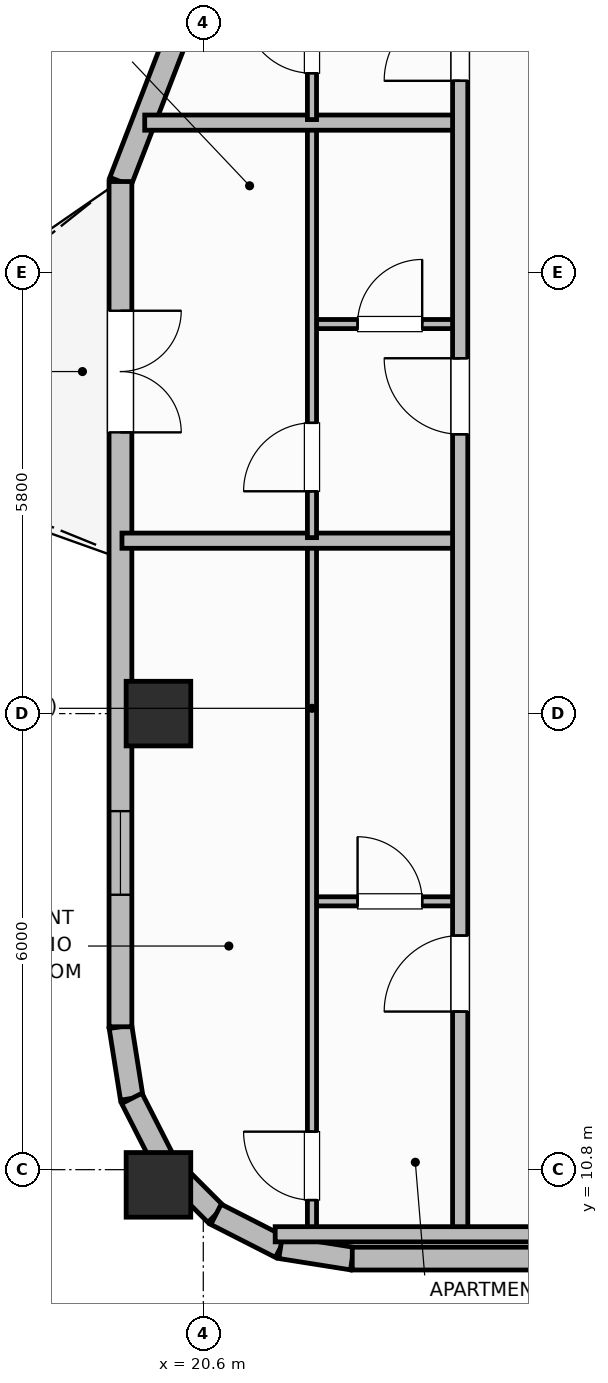
"""IFC4 building model, lengths in metres.
Left out: names, types, materials, properties, quantities, classifications, styles, units other than length and angle.
Written with IfcOpenShell. Run it as: python <this file> out.ifc"""

import sys

from ifc_helpers import new_model, si_unit, direction, frame, frame_2d, origin, origin_2d, place, context, subcontext, project, spatial, rectangle, extrude, element, fill, save


model = new_model("IFC4")
c1 = context("Model", 3, precision=1e-05, world=origin(), true_north=direction((0.0, 1.0)))
c2 = subcontext(c1, "Body", "Model", "MODEL_VIEW")
j1 = project(units=[si_unit("LENGTHUNIT", "METRE"), si_unit("PLANEANGLEUNIT", "RADIAN")], contexts=[c1])
p1 = place(None, origin())
s1 = spatial("IfcSite", under=j1, at=p1, CompositionType="ELEMENT")
p2 = place(p1, origin())
s2 = spatial("IfcBuilding", under=s1, at=p2, CompositionType="ELEMENT")
p3 = place(p2, frame((0.0, 0.0, 233.2)))
s3 = spatial("IfcBuildingStorey", under=s2, at=p3, CompositionType="ELEMENT", Elevation=233.2)
for number, where, z_axis, x_axis in (
    (1, (20.01, 10.6, 0.0), (0.0, 0.0, 1.0), (1.0, 0.0, 0.0)),
    (2, (20.01, 16.8, 0.0), (0.0, 0.0, 1.0), (1.0, 0.0, 0.0)),
):
    element("IfcColumn", number, at=place(p3, frame(where, z_axis=z_axis, x_axis=x_axis)), inside=s3, PredefinedType="COLUMN", context=c2, shape_type="SweptSolid", body=[
        extrude(rectangle(XDim=0.85, YDim=0.85, at=origin_2d()), origin(), (0.0, 0.0, 1.0), 3.7),
    ])
p4 = place(p3, frame((19.51, 12.68, 0.0), z_axis=(0.0, 0.0, 1.0), x_axis=(0.156343617883, -0.987702725088, 0.0)))
e3 = element("IfcWall", 3, at=p4, inside=s3, PredefinedType="SOLIDWALL", context=c2, shape_type="SweptSolid", body=[
    extrude(rectangle(XDim=0.954, YDim=0.3, at=frame_2d((0.477, 0.0))), origin(), (0.0, 0.0, 1.0), 2.73),
])
for number, where, z_axis, x_axis in (
    (4, (19.659, 11.738, 0.0), (0.0, 0.0, 1.0), (0.454, -0.891, 0.0)),
    (5, (20.093, 10.887, 0.0), (0.0, 0.0, 1.0), (0.707, -0.707, 0.0)),
):
    element("IfcWall", number, at=place(p3, frame(where, z_axis=z_axis, x_axis=x_axis)), inside=s3, PredefinedType="SOLIDWALL", context=c2, shape_type="SweptSolid", body=[
        extrude(rectangle(XDim=0.954, YDim=0.3, at=frame_2d((0.477, 0.0))), origin(), (0.0, 0.0, 1.0), 2.73),
    ])
p5 = place(p3, frame((20.767, 10.212, 0.0), z_axis=(0.0, 0.0, 1.0), x_axis=(0.891023873617, -0.45395644796, 0.0)))
e6 = element("IfcWall", 6, at=p5, inside=s3, PredefinedType="SOLIDWALL", context=c2, shape_type="SweptSolid", body=[
    extrude(rectangle(XDim=0.954, YDim=0.3, at=frame_2d((0.477, 0.0))), origin(), (0.0, 0.0, 1.0), 2.73),
])
p6 = place(p3, frame((21.617, 9.779, 0.0), z_axis=(0.0, 0.0, 1.0), x_axis=(0.987669453596, -0.156553666304, 0.0)))
e7 = element("IfcWall", 7, at=p6, inside=s3, PredefinedType="SOLIDWALL", context=c2, shape_type="SweptSolid", body=[
    extrude(rectangle(XDim=0.954, YDim=0.3, at=frame_2d((0.477, 0.0))), origin(), (0.0, 0.0, 1.0), 2.73),
])
p7 = place(p3, frame((22.56, 9.63, 0.0), z_axis=(0.0, 0.0, 1.0), x_axis=(1.0, 0.0, 0.0)))
e8 = element("IfcWall", 8, at=p7, inside=s3, PredefinedType="SOLIDWALL", context=c2, shape_type="SweptSolid", body=[
    extrude(rectangle(XDim=33.28, YDim=0.3, at=frame_2d((16.64, 0.0))), origin(), (0.0, 0.0, 1.0), 2.73),
])
p8 = place(p7, frame((4.461, 0.0, 0.95)))
e9 = element("IfcOpeningElement", 9, at=p8, cuts=e8, PredefinedType="OPENING", context=c2, shape_type="SweptSolid", body=[
    extrude(rectangle(XDim=1.1, YDim=1.65, at=frame_2d((0.55, 0.825))), frame((0.0, 0.16, 0.0), z_axis=(0.0, -1.0, 0.0), x_axis=(1.0, 0.0, 0.0)), (0.0, 0.0, 1.0), 0.32),
])
p9 = place(p7, frame((7.368, 0.0, 0.95)))
e10 = element("IfcOpeningElement", 10, at=p9, cuts=e8, PredefinedType="OPENING", context=c2, shape_type="SweptSolid", body=[
    extrude(rectangle(XDim=1.1, YDim=1.65, at=frame_2d((0.55, 0.825))), frame((0.0, 0.16, 0.0), z_axis=(0.0, -1.0, 0.0), x_axis=(1.0, 0.0, 0.0)), (0.0, 0.0, 1.0), 0.32),
])
p10 = place(p7, frame((10.275, 0.0, 0.95)))
e11 = element("IfcOpeningElement", 11, at=p10, cuts=e8, PredefinedType="OPENING", context=c2, shape_type="SweptSolid", body=[
    extrude(rectangle(XDim=1.1, YDim=1.65, at=frame_2d((0.55, 0.825))), frame((0.0, 0.16, 0.0), z_axis=(0.0, -1.0, 0.0), x_axis=(1.0, 0.0, 0.0)), (0.0, 0.0, 1.0), 0.32),
])
p11 = place(p7, frame((13.883, 0.0, 0.95)))
e12 = element("IfcOpeningElement", 12, at=p11, cuts=e8, PredefinedType="OPENING", context=c2, shape_type="SweptSolid", body=[
    extrude(rectangle(XDim=1.1, YDim=1.65, at=frame_2d((0.55, 0.825))), frame((0.0, 0.16, 0.0), z_axis=(0.0, -1.0, 0.0), x_axis=(1.0, 0.0, 0.0)), (0.0, 0.0, 1.0), 0.32),
])
p12 = place(p7, frame((16.09, 0.0, 0.95)))
e13 = element("IfcOpeningElement", 13, at=p12, cuts=e8, PredefinedType="OPENING", context=c2, shape_type="SweptSolid", body=[
    extrude(rectangle(XDim=1.1, YDim=1.65, at=frame_2d((0.55, 0.825))), frame((0.0, 0.16, 0.0), z_axis=(0.0, -1.0, 0.0), x_axis=(1.0, 0.0, 0.0)), (0.0, 0.0, 1.0), 0.32),
])
p13 = place(p7, frame((18.297, 0.0, 0.95)))
e14 = element("IfcOpeningElement", 14, at=p13, cuts=e8, PredefinedType="OPENING", context=c2, shape_type="SweptSolid", body=[
    extrude(rectangle(XDim=1.1, YDim=1.65, at=frame_2d((0.55, 0.825))), frame((0.0, 0.16, 0.0), z_axis=(0.0, -1.0, 0.0), x_axis=(1.0, 0.0, 0.0)), (0.0, 0.0, 1.0), 0.32),
])
p14 = place(p7, frame((21.905, 0.0, 0.95)))
e15 = element("IfcOpeningElement", 15, at=p14, cuts=e8, PredefinedType="OPENING", context=c2, shape_type="SweptSolid", body=[
    extrude(rectangle(XDim=1.1, YDim=1.65, at=frame_2d((0.55, 0.825))), frame((0.0, 0.16, 0.0), z_axis=(0.0, -1.0, 0.0), x_axis=(1.0, 0.0, 0.0)), (0.0, 0.0, 1.0), 0.32),
])
p15 = place(p7, frame((24.812, 0.0, 0.95)))
e16 = element("IfcOpeningElement", 16, at=p15, cuts=e8, PredefinedType="OPENING", context=c2, shape_type="SweptSolid", body=[
    extrude(rectangle(XDim=1.1, YDim=1.65, at=frame_2d((0.55, 0.825))), frame((0.0, 0.16, 0.0), z_axis=(0.0, -1.0, 0.0), x_axis=(1.0, 0.0, 0.0)), (0.0, 0.0, 1.0), 0.32),
])
p16 = place(p7, frame((27.719, 0.0, 0.95)))
e17 = element("IfcOpeningElement", 17, at=p16, cuts=e8, PredefinedType="OPENING", context=c2, shape_type="SweptSolid", body=[
    extrude(rectangle(XDim=1.1, YDim=1.65, at=frame_2d((0.55, 0.825))), frame((0.0, 0.16, 0.0), z_axis=(0.0, -1.0, 0.0), x_axis=(1.0, 0.0, 0.0)), (0.0, 0.0, 1.0), 0.32),
])
p17 = place(p3, frame((20.36, 26.0, 0.0), z_axis=(0.0, 0.0, 1.0), x_axis=(-0.360442266984, -0.932781524351, 0.0)))
e18 = element("IfcWall", 18, at=p17, inside=s3, PredefinedType="SOLIDWALL", context=c2, shape_type="SweptSolid", body=[
    extrude(rectangle(XDim=2.358, YDim=0.3, at=frame_2d((1.179, 0.0))), origin(), (0.0, 0.0, 1.0), 2.73),
])
p18 = place(p3, frame((19.51, 23.8, 0.0), z_axis=(0.0, 0.0, 1.0), x_axis=(0.0, -1.0, 0.0)))
e19 = element("IfcWall", 19, at=p18, inside=s3, PredefinedType="SOLIDWALL", context=c2, shape_type="SweptSolid", body=[
    extrude(rectangle(XDim=11.12, YDim=0.3, at=frame_2d((5.56, 0.0))), origin(), (0.0, 0.0, 1.0), 2.73),
])
p19 = place(p18, frame((1.7, 0.0, 0.0)))
e20 = element("IfcOpeningElement", 20, at=p19, cuts=e19, PredefinedType="OPENING", context=c2, shape_type="SweptSolid", body=[
    extrude(rectangle(XDim=1.6, YDim=2.1, at=frame_2d((0.8, 1.05))), frame((0.0, 0.16, 0.0), z_axis=(0.0, -1.0, 0.0), x_axis=(1.0, 0.0, 0.0)), (0.0, 0.0, 1.0), 0.32),
])
p20 = place(p18, frame((8.283, 0.0, 0.95)))
e21 = element("IfcOpeningElement", 21, at=p20, cuts=e19, PredefinedType="OPENING", context=c2, shape_type="SweptSolid", body=[
    extrude(rectangle(XDim=1.1, YDim=1.65, at=frame_2d((0.55, 0.825))), frame((0.0, 0.16, 0.0), z_axis=(0.0, -1.0, 0.0), x_axis=(1.0, 0.0, 0.0)), (0.0, 0.0, 1.0), 0.32),
])
p21 = place(p3, frame((22.03, 14.33, 0.0), z_axis=(0.0, 0.0, 1.0), x_axis=(1.0, 0.0, 0.0)))
e22 = element("IfcWall", 22, at=p21, inside=s3, PredefinedType="PARTITIONING", context=c2, shape_type="SweptSolid", body=[
    extrude(rectangle(XDim=1.95, YDim=0.12, at=frame_2d((0.975, 0.0))), origin(), (0.0, 0.0, 1.0), 2.56),
])
p22 = place(p21, frame((0.6, 0.0, 0.0)))
e23 = element("IfcOpeningElement", 23, at=p22, cuts=e22, PredefinedType="OPENING", context=c2, shape_type="SweptSolid", body=[
    extrude(rectangle(XDim=0.85, YDim=2.1, at=frame_2d((0.425, 1.05))), frame((0.0, 0.07, 0.0), z_axis=(0.0, -1.0, 0.0), x_axis=(1.0, 0.0, 0.0)), (0.0, 0.0, 1.0), 0.14),
])
p23 = place(p3, frame((22.03, 9.99, 0.0), z_axis=(0.0, 0.0, 1.0), x_axis=(0.0, 1.0, 0.0)))
e24 = element("IfcWall", 24, at=p23, inside=s3, PredefinedType="PARTITIONING", context=c2, shape_type="SweptSolid", body=[
    extrude(rectangle(XDim=9.045, YDim=0.12, at=frame_2d((4.522, 0.0))), origin(), (0.0, 0.0, 1.0), 2.56),
])
p24 = place(p23, frame((0.41, 0.0, 0.0)))
e25 = element("IfcOpeningElement", 25, at=p24, cuts=e24, PredefinedType="OPENING", context=c2, shape_type="SweptSolid", body=[
    extrude(rectangle(XDim=0.9, YDim=2.1, at=frame_2d((0.45, 1.05))), frame((0.0, 0.07, 0.0), z_axis=(0.0, -1.0, 0.0), x_axis=(1.0, 0.0, 0.0)), (0.0, 0.0, 1.0), 0.14),
])
p25 = place(p3, frame((19.53, 19.075, 0.0), z_axis=(0.0, 0.0, 1.0), x_axis=(1.0, 0.0, 0.0)))
e26 = element("IfcWall", 26, at=p25, inside=s3, PredefinedType="PARTITIONING", context=c2, shape_type="SweptSolid", body=[
    extrude(rectangle(XDim=4.45, YDim=0.2, at=frame_2d((2.225, 0.0))), origin(), (0.0, 0.0, 1.0), 2.56),
])
p26 = place(p3, frame((22.03, 21.925, 0.0), z_axis=(0.0, 0.0, 1.0), x_axis=(1.0, 0.0, 0.0)))
e27 = element("IfcWall", 27, at=p26, inside=s3, PredefinedType="PARTITIONING", context=c2, shape_type="SweptSolid", body=[
    extrude(rectangle(XDim=1.95, YDim=0.12, at=frame_2d((0.975, 0.0))), origin(), (0.0, 0.0, 1.0), 2.56),
])
p27 = place(p26, frame((0.6, 0.0, 0.0)))
e28 = element("IfcOpeningElement", 28, at=p27, cuts=e27, PredefinedType="OPENING", context=c2, shape_type="SweptSolid", body=[
    extrude(rectangle(XDim=0.85, YDim=2.1, at=frame_2d((0.425, 1.05))), frame((0.0, 0.07, 0.0), z_axis=(0.0, -1.0, 0.0), x_axis=(1.0, 0.0, 0.0)), (0.0, 0.0, 1.0), 0.14),
])
p28 = place(p3, frame((22.03, 19.115, 0.0), z_axis=(0.0, 0.0, 1.0), x_axis=(0.0, 1.0, 0.0)))
e29 = element("IfcWall", 29, at=p28, inside=s3, PredefinedType="PARTITIONING", context=c2, shape_type="SweptSolid", body=[
    extrude(rectangle(XDim=5.42, YDim=0.12, at=frame_2d((2.71, 0.0))), origin(), (0.0, 0.0, 1.0), 2.56),
])
p29 = place(p28, frame((0.61, 0.0, 0.0)))
e30 = element("IfcOpeningElement", 30, at=p29, cuts=e29, PredefinedType="OPENING", context=c2, shape_type="SweptSolid", body=[
    extrude(rectangle(XDim=0.9, YDim=2.1, at=frame_2d((0.45, 1.05))), frame((0.0, 0.07, 0.0), z_axis=(0.0, -1.0, 0.0), x_axis=(1.0, 0.0, 0.0)), (0.0, 0.0, 1.0), 0.14),
])
p30 = place(p3, frame((19.829, 24.575, 0.0), z_axis=(0.0, 0.0, 1.0), x_axis=(1.0, 0.0, 0.0)))
e31 = element("IfcWall", 31, at=p30, inside=s3, PredefinedType="PARTITIONING", context=c2, shape_type="SweptSolid", body=[
    extrude(rectangle(XDim=4.151, YDim=0.2, at=frame_2d((2.075, 0.0))), origin(), (0.0, 0.0, 1.0), 2.56),
])
p31 = place(p3, frame((22.03, 24.615, 0.0), z_axis=(0.0, 0.0, 1.0), x_axis=(0.0, 1.0, 0.0)))
e32 = element("IfcWall", 32, at=p31, inside=s3, PredefinedType="PARTITIONING", context=c2, shape_type="SweptSolid", body=[
    extrude(rectangle(XDim=12.67, YDim=0.12, at=frame_2d((6.335, 0.0))), origin(), (0.0, 0.0, 1.0), 2.56),
])
p32 = place(p31, frame((0.61, 0.0, 0.0)))
e33 = element("IfcOpeningElement", 33, at=p32, cuts=e32, PredefinedType="OPENING", context=c2, shape_type="SweptSolid", body=[
    extrude(rectangle(XDim=0.9, YDim=2.1, at=frame_2d((0.45, 1.05))), frame((0.0, 0.07, 0.0), z_axis=(0.0, -1.0, 0.0), x_axis=(1.0, 0.0, 0.0)), (0.0, 0.0, 1.0), 0.14),
])
p33 = place(p31, frame((10.51, 0.0, 0.0)))
e34 = element("IfcOpeningElement", 34, at=p33, cuts=e32, PredefinedType="OPENING", context=c2, shape_type="SweptSolid", body=[
    extrude(rectangle(XDim=0.82, YDim=2.08, at=frame_2d((0.41, 1.04))), frame((0.0, 0.07, 0.0), z_axis=(0.0, -1.0, 0.0), x_axis=(1.0, 0.0, 0.0)), (0.0, 0.0, 1.0), 0.14),
])
p34 = place(p3, frame((23.98, 9.95, 0.0), z_axis=(0.0, 0.0, 1.0), x_axis=(0.0, 1.0, 0.0)))
e35 = element("IfcWall", 35, at=p34, inside=s3, PredefinedType="PARTITIONING", context=c2, shape_type="SweptSolid", body=[
    extrude(rectangle(XDim=36.5, YDim=0.2, at=frame_2d((18.25, 0.0))), origin(), (0.0, 0.0, 1.0), 2.56),
])
p35 = place(p34, frame((2.93, 0.0, 0.0)))
e36 = element("IfcOpeningElement", 36, at=p35, cuts=e35, PredefinedType="OPENING", context=c2, shape_type="SweptSolid", body=[
    extrude(rectangle(XDim=1.0, YDim=2.15, at=frame_2d((0.5, 1.075))), frame((0.0, 0.11, 0.0), z_axis=(0.0, -1.0, 0.0), x_axis=(1.0, 0.0, 0.0)), (0.0, 0.0, 1.0), 0.22),
])
p36 = place(p34, frame((10.525, 0.0, 0.0)))
e37 = element("IfcOpeningElement", 37, at=p36, cuts=e35, PredefinedType="OPENING", context=c2, shape_type="SweptSolid", body=[
    extrude(rectangle(XDim=1.0, YDim=2.15, at=frame_2d((0.5, 1.075))), frame((0.0, 0.11, 0.0), z_axis=(0.0, -1.0, 0.0), x_axis=(1.0, 0.0, 0.0)), (0.0, 0.0, 1.0), 0.22),
])
p37 = place(p34, frame((15.175, 0.0, 0.0)))
e38 = element("IfcOpeningElement", 38, at=p37, cuts=e35, PredefinedType="OPENING", context=c2, shape_type="SweptSolid", body=[
    extrude(rectangle(XDim=1.0, YDim=2.15, at=frame_2d((0.5, 1.075))), frame((0.0, 0.11, 0.0), z_axis=(0.0, -1.0, 0.0), x_axis=(1.0, 0.0, 0.0)), (0.0, 0.0, 1.0), 0.22),
])
p38 = place(p34, frame((27.925, 0.0, 0.0)))
e39 = element("IfcOpeningElement", 39, at=p38, cuts=e35, PredefinedType="OPENING", context=c2, shape_type="SweptSolid", body=[
    extrude(rectangle(XDim=1.0, YDim=2.15, at=frame_2d((0.5, 1.075))), frame((0.0, 0.11, 0.0), z_axis=(0.0, -1.0, 0.0), x_axis=(1.0, 0.0, 0.0)), (0.0, 0.0, 1.0), 0.22),
])
p39 = place(p3, frame((21.546, 9.95, 0.0), z_axis=(0.0, 0.0, 1.0), x_axis=(1.0, 0.0, 0.0)))
e40 = element("IfcWall", 40, at=p39, inside=s3, PredefinedType="PARTITIONING", context=c2, shape_type="SweptSolid", body=[
    extrude(rectangle(XDim=3.754, YDim=0.2, at=frame_2d((1.877, 0.0))), origin(), (0.0, 0.0, 1.0), 2.56),
])
p40 = place(p19, origin())
e41 = element("IfcDoor", 41, at=p40, inside=s3, OperationType="DOUBLE_DOOR_SINGLE_SWING", PredefinedType="DOOR", context=c2, shape_type="SweptSolid", body=[
    extrude(rectangle(XDim=1.6, YDim=2.1, at=frame_2d((0.8, 1.05))), frame((0.0, 0.025, 0.0), z_axis=(0.0, -1.0, 0.0), x_axis=(1.0, 0.0, 0.0)), (0.0, 0.0, 1.0), 0.05),
])
fill(e20, e41)
p41 = place(p20, origin())
e42 = element("IfcWindow", 42, at=p41, inside=s3, PartitioningType="SINGLE_PANEL", PredefinedType="WINDOW", context=c2, shape_type="SweptSolid", body=[
    extrude(rectangle(XDim=1.1, YDim=1.65, at=frame_2d((0.55, 0.825))), frame((0.0, 0.03, 0.0), z_axis=(0.0, -1.0, 0.0), x_axis=(1.0, 0.0, 0.0)), (0.0, 0.0, 1.0), 0.06),
])
fill(e21, e42)
p42 = place(p22, origin())
e43 = element("IfcDoor", 43, at=p42, inside=s3, OperationType="SINGLE_SWING_LEFT", PredefinedType="DOOR", context=c2, shape_type="SweptSolid", body=[
    extrude(rectangle(XDim=0.85, YDim=2.1, at=frame_2d((0.425, 1.05))), frame((0.0, 0.025, 0.0), z_axis=(0.0, -1.0, 0.0), x_axis=(1.0, 0.0, 0.0)), (0.0, 0.0, 1.0), 0.05),
])
fill(e23, e43)
p43 = place(p24, origin())
e44 = element("IfcDoor", 44, at=p43, inside=s3, OperationType="SINGLE_SWING_RIGHT", PredefinedType="DOOR", context=c2, shape_type="SweptSolid", body=[
    extrude(rectangle(XDim=0.9, YDim=2.1, at=frame_2d((0.45, 1.05))), frame((0.0, 0.025, 0.0), z_axis=(0.0, -1.0, 0.0), x_axis=(1.0, 0.0, 0.0)), (0.0, 0.0, 1.0), 0.05),
])
fill(e25, e44)
p44 = place(p27, origin())
e45 = element("IfcDoor", 45, at=p44, inside=s3, OperationType="SINGLE_SWING_RIGHT", PredefinedType="DOOR", context=c2, shape_type="SweptSolid", body=[
    extrude(rectangle(XDim=0.85, YDim=2.1, at=frame_2d((0.425, 1.05))), frame((0.0, 0.025, 0.0), z_axis=(0.0, -1.0, 0.0), x_axis=(1.0, 0.0, 0.0)), (0.0, 0.0, 1.0), 0.05),
])
fill(e28, e45)
p45 = place(p29, origin())
e46 = element("IfcDoor", 46, at=p45, inside=s3, OperationType="SINGLE_SWING_LEFT", PredefinedType="DOOR", context=c2, shape_type="SweptSolid", body=[
    extrude(rectangle(XDim=0.9, YDim=2.1, at=frame_2d((0.45, 1.05))), frame((0.0, 0.025, 0.0), z_axis=(0.0, -1.0, 0.0), x_axis=(1.0, 0.0, 0.0)), (0.0, 0.0, 1.0), 0.05),
])
fill(e30, e46)
p46 = place(p32, origin())
e47 = element("IfcDoor", 47, at=p46, inside=s3, OperationType="SINGLE_SWING_RIGHT", PredefinedType="DOOR", context=c2, shape_type="SweptSolid", body=[
    extrude(rectangle(XDim=0.9, YDim=2.1, at=frame_2d((0.45, 1.05))), frame((0.0, 0.025, 0.0), z_axis=(0.0, -1.0, 0.0), x_axis=(1.0, 0.0, 0.0)), (0.0, 0.0, 1.0), 0.05),
])
fill(e33, e47)
p47 = place(p35, origin())
e48 = element("IfcDoor", 48, at=p47, inside=s3, OperationType="SINGLE_SWING_LEFT", PredefinedType="DOOR", context=c2, shape_type="SweptSolid", body=[
    extrude(rectangle(XDim=1.0, YDim=2.15, at=frame_2d((0.5, 1.075))), frame((0.0, 0.025, 0.0), z_axis=(0.0, -1.0, 0.0), x_axis=(1.0, 0.0, 0.0)), (0.0, 0.0, 1.0), 0.05),
])
fill(e36, e48)
p48 = place(p36, origin())
e49 = element("IfcDoor", 49, at=p48, inside=s3, OperationType="SINGLE_SWING_RIGHT", PredefinedType="DOOR", context=c2, shape_type="SweptSolid", body=[
    extrude(rectangle(XDim=1.0, YDim=2.15, at=frame_2d((0.5, 1.075))), frame((0.0, 0.025, 0.0), z_axis=(0.0, -1.0, 0.0), x_axis=(1.0, 0.0, 0.0)), (0.0, 0.0, 1.0), 0.05),
])
fill(e37, e49)
p49 = place(p37, origin())
e50 = element("IfcDoor", 50, at=p49, inside=s3, OperationType="SINGLE_SWING_LEFT", PredefinedType="DOOR", context=c2, shape_type="SweptSolid", body=[
    extrude(rectangle(XDim=1.0, YDim=2.15, at=frame_2d((0.5, 1.075))), frame((0.0, 0.025, 0.0), z_axis=(0.0, -1.0, 0.0), x_axis=(1.0, 0.0, 0.0)), (0.0, 0.0, 1.0), 0.05),
])
fill(e38, e50)
save(model, sys.argv[1])
